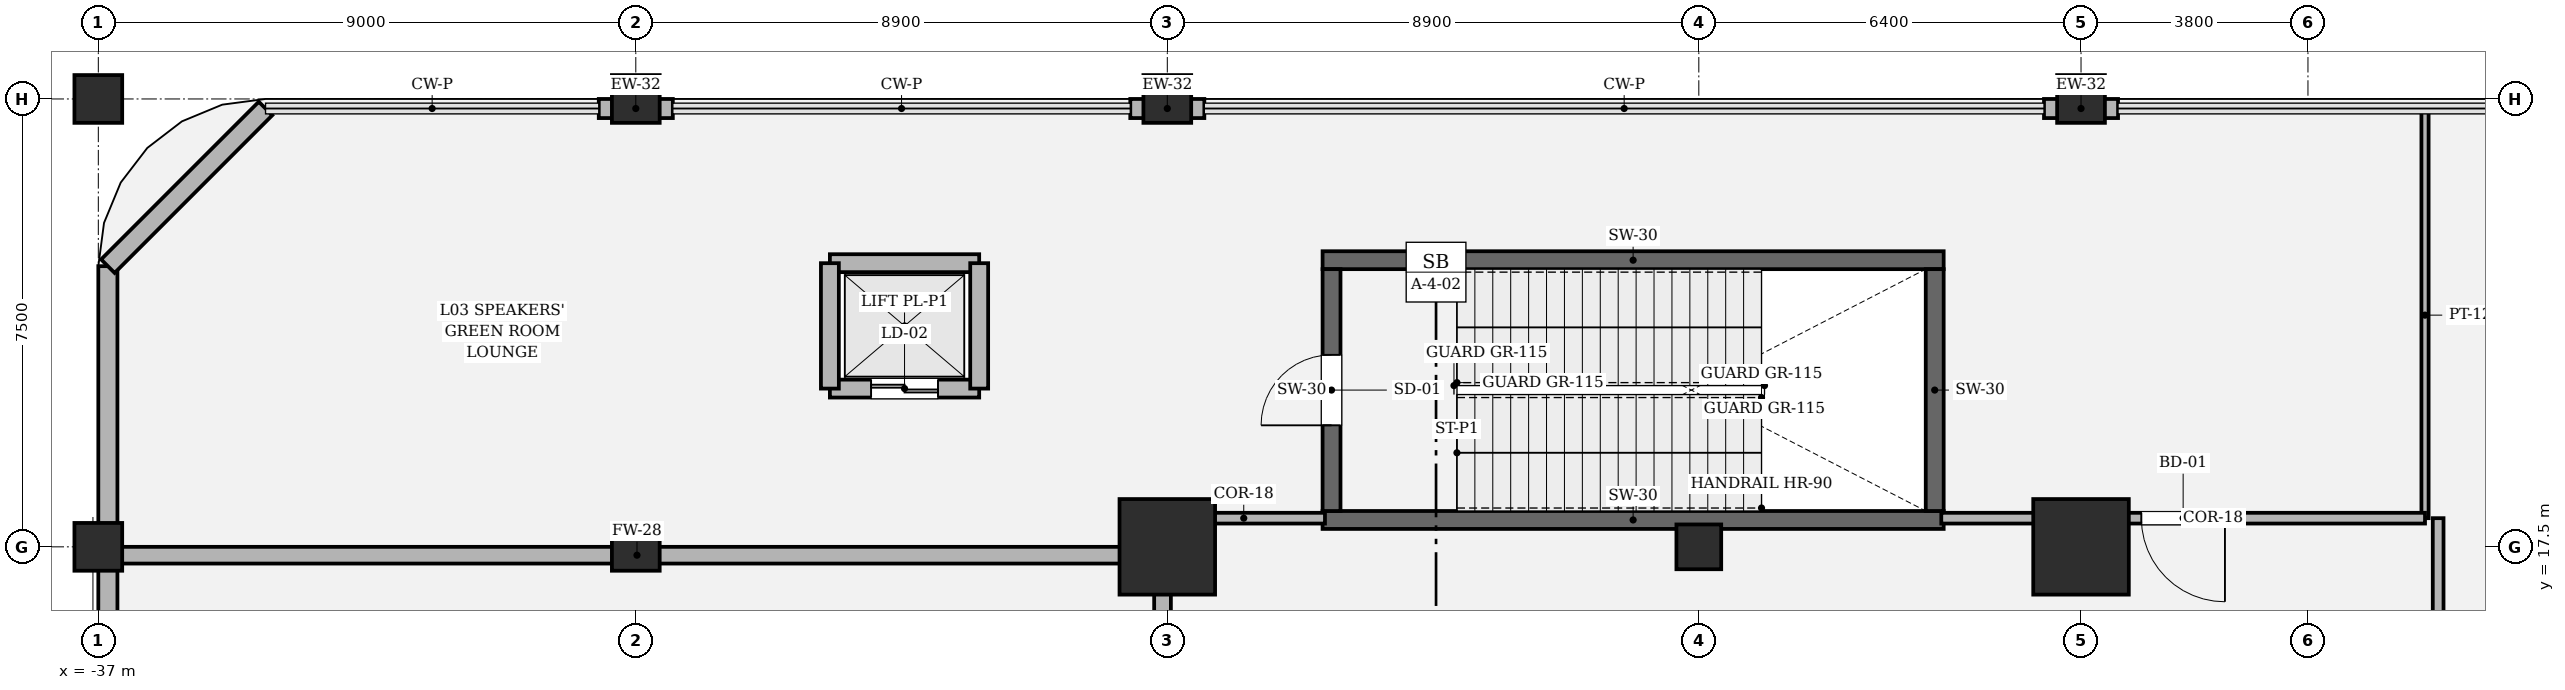
"""IFC4 building model, lengths in metres.
Left out: names, types, materials, properties, quantities, classifications, styles, units other than length and angle.
Written with IfcOpenShell. Run it as: python <this file> out.ifc"""

import sys

from ifc_helpers import new_model, si_unit, direction, frame, frame_2d, origin, origin_2d, place, context, subcontext, project, spatial, rectangle, hollow_rectangle, circle, extrude, element, fill, save


model = new_model("IFC4")
c1 = context("Model", 3, precision=1e-05, world=origin(), true_north=direction((0.0, 1.0)))
c2 = subcontext(c1, "Body", "Model", "MODEL_VIEW")
j1 = project(units=[si_unit("LENGTHUNIT", "METRE"), si_unit("PLANEANGLEUNIT", "RADIAN")], contexts=[c1])
p1 = place(None, origin())
s1 = spatial("IfcSite", under=j1, at=p1, CompositionType="ELEMENT")
p2 = place(p1, origin())
s2 = spatial("IfcBuilding", under=s1, at=p2, CompositionType="ELEMENT")
p3 = place(p2, frame((0.0, 0.0, 16.8)))
s3 = spatial("IfcBuildingStorey", under=s2, at=p3, CompositionType="ELEMENT", Elevation=16.8)
for number, where, z_axis, x_axis in (
    (1, (-16.5, 17.95, 0.0), (0.0, 0.0, 1.0), (1.0, 0.0, 0.0)),
    (2, (-6.1, 22.3, 0.0), (0.0, 0.0, 1.0), (-1.0, 0.0, 0.0)),
):
    element("IfcWall", number, at=place(p3, frame(where, z_axis=z_axis, x_axis=x_axis)), inside=s3, PredefinedType="SOLIDWALL", context=c2, shape_type="SweptSolid", body=[
        extrude(rectangle(XDim=10.4, YDim=0.3, at=frame_2d((5.2, 0.0))), origin(), (0.0, 0.0, 1.0), 5.4),
    ])
p4 = place(p3, frame((-16.35, 18.1, 0.0), z_axis=(0.0, 0.0, 1.0), x_axis=(0.0, 1.0, 0.0)))
e3 = element("IfcWall", 3, at=p4, inside=s3, PredefinedType="SOLIDWALL", context=c2, shape_type="SweptSolid", body=[
    extrude(rectangle(XDim=4.05, YDim=0.3, at=frame_2d((2.025, 0.0))), origin(), (0.0, 0.0, 1.0), 5.4),
])
p5 = place(p4, frame((1.435, 0.0, 0.0)))
e4 = element("IfcOpeningElement", 4, at=p5, cuts=e3, PredefinedType="OPENING", context=c2, shape_type="SweptSolid", body=[
    extrude(rectangle(XDim=1.18, YDim=2.2, at=frame_2d((0.59, 1.1))), frame((0.0, 0.16, 0.0), z_axis=(0.0, -1.0, 0.0), x_axis=(1.0, 0.0, 0.0)), (0.0, 0.0, 1.0), 0.32),
])
p6 = place(p3, frame((-6.25, 22.15, 0.0), z_axis=(0.0, 0.0, 1.0), x_axis=(0.0, -1.0, 0.0)))
e5 = element("IfcWall", 5, at=p6, inside=s3, PredefinedType="SOLIDWALL", context=c2, shape_type="SweptSolid", body=[
    extrude(rectangle(XDim=4.05, YDim=0.3, at=frame_2d((2.025, 0.0))), origin(), (0.0, 0.0, 1.0), 5.4),
])
for number, where, z_axis, x_axis in (
    (6, (-3.8, 17.5, 0.0), (0.0, 0.0, 1.0), (1.0, 0.0, 0.0)),
    (7, (-19.1, 17.5, 0.0), (0.0, 0.0, 1.0), (1.0, 0.0, 0.0)),
):
    element("IfcColumn", number, at=place(p3, frame(where, z_axis=z_axis, x_axis=x_axis)), inside=s3, PredefinedType="COLUMN", context=c2, shape_type="SweptSolid", body=[
        extrude(hollow_rectangle(XDim=1.6, YDim=1.6, WallThickness=0.05, at=origin_2d()), origin(), (0.0, 0.0, 1.0), 5.4),
    ])
for number, where, z_axis, x_axis in (
    (8, (-37.0, 17.5, 0.0), (0.0, 0.0, 1.0), (1.0, 0.0, 0.0)),
    (9, (-28.0, 17.5, 0.0), (0.0, 0.0, 1.0), (1.0, 0.0, 0.0)),
    (10, (-37.0, 25.0, 0.0), (0.0, 0.0, 1.0), (1.0, 0.0, 0.0)),
    (11, (-28.0, 25.0, 0.0), (0.0, 0.0, 1.0), (1.0, 0.0, 0.0)),
    (12, (-19.1, 25.0, 0.0), (0.0, 0.0, 1.0), (1.0, 0.0, 0.0)),
    (13, (-3.8, 25.0, 0.0), (0.0, 0.0, 1.0), (1.0, 0.0, 0.0)),
):
    element("IfcColumn", number, at=place(p3, frame(where, z_axis=z_axis, x_axis=x_axis)), inside=s3, PredefinedType="COLUMN", context=c2, shape_type="SweptSolid", body=[
        extrude(rectangle(XDim=0.8, YDim=0.8, at=origin_2d()), origin(), (0.0, 0.0, 1.0), 5.4),
    ])
p7 = place(p3, frame((-10.2, 17.5, 0.0), z_axis=(0.0, 0.0, 1.0), x_axis=(1.0, 0.0, 0.0)))
e14 = element("IfcColumn", 14, at=p7, inside=s3, PredefinedType="PILASTER", context=c2, shape_type="SweptSolid", body=[
    extrude(circle(Radius=0.375, at=origin_2d()), origin(), (0.0, 0.0, 1.0), 5.4),
])
p8 = place(p3, frame((-27.38, 24.84, 0.0), z_axis=(0.0, 0.0, 1.0), x_axis=(-1.0, 0.0, 0.0)))
e15 = element("IfcWall", 15, at=p8, inside=s3, PredefinedType="SOLIDWALL", context=c2, shape_type="SweptSolid", body=[
    extrude(rectangle(XDim=1.24, YDim=0.32, at=frame_2d((0.62, 0.0))), origin(), (0.0, 0.0, 1.0), 4.314),
])
for number, where, z_axis, x_axis in (
    (16, (-18.48, 24.84, 0.0), (0.0, 0.0, 1.0), (-1.0, 0.0, 0.0)),
    (17, (-3.18, 24.84, 0.0), (0.0, 0.0, 1.0), (-1.0, 0.0, 0.0)),
):
    element("IfcWall", number, at=place(p3, frame(where, z_axis=z_axis, x_axis=x_axis)), inside=s3, PredefinedType="SOLIDWALL", context=c2, shape_type="SweptSolid", body=[
        extrude(rectangle(XDim=1.24, YDim=0.32, at=frame_2d((0.62, 0.0))), origin(), (0.0, 0.0, 1.0), 4.314),
    ])
p9 = place(p3, frame((-36.84, -22.2, 0.0), z_axis=(0.0, 0.0, 1.0), x_axis=(0.0, 1.0, 0.0)))
e18 = element("IfcWall", 18, at=p9, inside=s3, PredefinedType="SOLIDWALL", context=c2, shape_type="SweptSolid", body=[
    extrude(rectangle(XDim=44.4, YDim=0.32, at=frame_2d((22.2, 0.0))), origin(), (0.0, 0.0, 1.0), 3.164),
])
p10 = place(p3, frame((-36.84, 22.2, 0.0), z_axis=(0.0, 0.0, 1.0), x_axis=(0.707106781187, 0.707106781187, 0.0)))
e19 = element("IfcWall", 19, at=p10, inside=s3, PredefinedType="SOLIDWALL", context=c2, shape_type="SweptSolid", body=[
    extrude(rectangle(XDim=3.734, YDim=0.32, at=frame_2d((1.867, 0.0))), origin(), (0.0, 0.0, 1.0), 4.464),
])
p11 = place(p3, frame((-24.75, 20.15, 0.0), z_axis=(0.0, 0.0, 1.0), x_axis=(1.0, 0.0, 0.0)))
e20 = element("IfcWall", 20, at=p11, inside=s3, PredefinedType="SOLIDWALL", context=c2, shape_type="SweptSolid", body=[
    extrude(rectangle(XDim=2.5, YDim=0.3, at=frame_2d((1.25, 0.0))), origin(), (0.0, 0.0, 1.0), 5.02),
])
p12 = place(p11, frame((0.69, 0.0, 0.0)))
e21 = element("IfcOpeningElement", 21, at=p12, cuts=e20, PredefinedType="OPENING", context=c2, shape_type="SweptSolid", body=[
    extrude(rectangle(XDim=1.12, YDim=2.25, at=frame_2d((0.56, 1.125))), frame((0.0, 0.16, 0.0), z_axis=(0.0, -1.0, 0.0), x_axis=(1.0, 0.0, 0.0)), (0.0, 0.0, 1.0), 0.32),
])
p13 = place(p3, frame((-24.75, 22.25, 0.0), z_axis=(0.0, 0.0, 1.0), x_axis=(1.0, 0.0, 0.0)))
e22 = element("IfcWall", 22, at=p13, inside=s3, PredefinedType="SOLIDWALL", context=c2, shape_type="SweptSolid", body=[
    extrude(rectangle(XDim=2.5, YDim=0.3, at=frame_2d((1.25, 0.0))), origin(), (0.0, 0.0, 1.0), 5.02),
])
for number, where, z_axis, x_axis in (
    (23, (-24.75, 20.15, 0.0), (0.0, 0.0, 1.0), (0.0, 1.0, 0.0)),
    (24, (-22.25, 20.15, 0.0), (0.0, 0.0, 1.0), (0.0, 1.0, 0.0)),
):
    element("IfcWall", number, at=place(p3, frame(where, z_axis=z_axis, x_axis=x_axis)), inside=s3, PredefinedType="SOLIDWALL", context=c2, shape_type="SweptSolid", body=[
        extrude(rectangle(XDim=2.1, YDim=0.3, at=frame_2d((1.05, 0.0))), origin(), (0.0, 0.0, 1.0), 5.02),
    ])
p14 = place(p3, frame((-36.78, 17.36, 0.0), z_axis=(0.0, 0.0, 1.0), x_axis=(1.0, 0.0, 0.0)))
e25 = element("IfcWall", 25, at=p14, inside=s3, PredefinedType="SOLIDWALL", context=c2, shape_type="SweptSolid", body=[
    extrude(rectangle(XDim=17.6, YDim=0.28, at=frame_2d((8.8, 0.0))), origin(), (0.0, 0.0, 1.0), 3.164),
])
p15 = place(p3, frame((-19.18, 17.36, 0.0), z_axis=(0.0, 0.0, 1.0), x_axis=(0.0, -1.0, 0.0)))
e26 = element("IfcWall", 26, at=p15, inside=s3, PredefinedType="SOLIDWALL", context=c2, shape_type="SweptSolid", body=[
    extrude(rectangle(XDim=29.54, YDim=0.28, at=frame_2d((14.77, 0.0))), origin(), (0.0, 0.0, 1.0), 3.164),
])
p16 = place(p15, frame((15.22, 0.0, 0.0)))
e27 = element("IfcOpeningElement", 27, at=p16, cuts=e26, PredefinedType="OPENING", context=c2, shape_type="SweptSolid", body=[
    extrude(rectangle(XDim=1.8, YDim=2.35, at=frame_2d((0.9, 1.175))), frame((0.0, 0.15, 0.0), z_axis=(0.0, -1.0, 0.0), x_axis=(1.0, 0.0, 0.0)), (0.0, 0.0, 1.0), 0.3),
])
p17 = place(p3, frame((1.96, 24.78, 0.0), z_axis=(0.0, 0.0, 1.0), x_axis=(0.0, -1.0, 0.0)))
e28 = element("IfcWall", 28, at=p17, inside=s3, PredefinedType="PARTITIONING", context=c2, shape_type="SweptSolid", body=[
    extrude(rectangle(XDim=6.8, YDim=0.12, at=frame_2d((3.4, 0.0))), origin(), (0.0, 0.0, 1.0), 5.02),
])
p18 = place(p3, frame((1.96, 17.98, 0.0), z_axis=(0.0, 0.0, 1.0), x_axis=(-1.0, 0.0, 0.0)))
e29 = element("IfcWall", 29, at=p18, inside=s3, PredefinedType="PARTITIONING", context=c2, shape_type="SweptSolid", body=[
    extrude(rectangle(XDim=8.1, YDim=0.18, at=frame_2d((4.05, 0.0))), origin(), (0.0, 0.0, 1.0), 4.314),
])
p19 = place(p18, frame((3.35, 0.0, 0.0)))
e30 = element("IfcOpeningElement", 30, at=p19, cuts=e29, PredefinedType="OPENING", context=c2, shape_type="SweptSolid", body=[
    extrude(rectangle(XDim=1.4, YDim=2.25, at=frame_2d((0.7, 1.125))), frame((0.0, 0.1, 0.0), z_axis=(0.0, -1.0, 0.0), x_axis=(1.0, 0.0, 0.0)), (0.0, 0.0, 1.0), 0.2),
])
p20 = place(p3, frame((-16.46, 17.98, 0.0), z_axis=(0.0, 0.0, 1.0), x_axis=(-1.0, 0.0, 0.0)))
e31 = element("IfcWall", 31, at=p20, inside=s3, PredefinedType="PARTITIONING", context=c2, shape_type="SweptSolid", body=[
    extrude(rectangle(XDim=2.72, YDim=0.18, at=frame_2d((1.36, 0.0))), origin(), (0.0, 0.0, 1.0), 4.314),
])
p21 = place(p3, frame((2.18, 12.18, 0.0), z_axis=(0.0, 0.0, 1.0), x_axis=(0.0, 1.0, 0.0)))
e32 = element("IfcWall", 32, at=p21, inside=s3, PredefinedType="PARTITIONING", context=c2, shape_type="SweptSolid", body=[
    extrude(rectangle(XDim=5.8, YDim=0.18, at=frame_2d((2.9, 0.0))), origin(), (0.0, 0.0, 1.0), 4.314),
])
p22 = place(p5, origin())
e33 = element("IfcDoor", 33, at=p22, inside=s3, OperationType="SINGLE_SWING_LEFT", PredefinedType="DOOR", context=c2, shape_type="SweptSolid", body=[
    extrude(rectangle(XDim=1.18, YDim=2.2, at=frame_2d((0.59, 1.1))), frame((0.0, 0.025, 0.0), z_axis=(0.0, -1.0, 0.0), x_axis=(1.0, 0.0, 0.0)), (0.0, 0.0, 1.0), 0.05),
])
fill(e4, e33)
p23 = place(p12, origin())
e34 = element("IfcDoor", 34, at=p23, inside=s3, OperationType="DOUBLE_DOOR_SLIDING", PredefinedType="DOOR", context=c2, shape_type="SweptSolid", body=[
    extrude(rectangle(XDim=1.12, YDim=2.25, at=frame_2d((0.56, 1.125))), frame((0.0, 0.025, 0.0), z_axis=(0.0, -1.0, 0.0), x_axis=(1.0, 0.0, 0.0)), (0.0, 0.0, 1.0), 0.05),
])
fill(e21, e34)
p24 = place(p19, origin())
e35 = element("IfcDoor", 35, at=p24, inside=s3, OperationType="SINGLE_SWING_LEFT", PredefinedType="DOOR", context=c2, shape_type="SweptSolid", body=[
    extrude(rectangle(XDim=1.4, YDim=2.25, at=frame_2d((0.7, 1.125))), frame((0.0, 0.025, 0.0), z_axis=(0.0, -1.0, 0.0), x_axis=(1.0, 0.0, 0.0)), (0.0, 0.0, 1.0), 0.05),
])
fill(e30, e35)
save(model, sys.argv[1])
